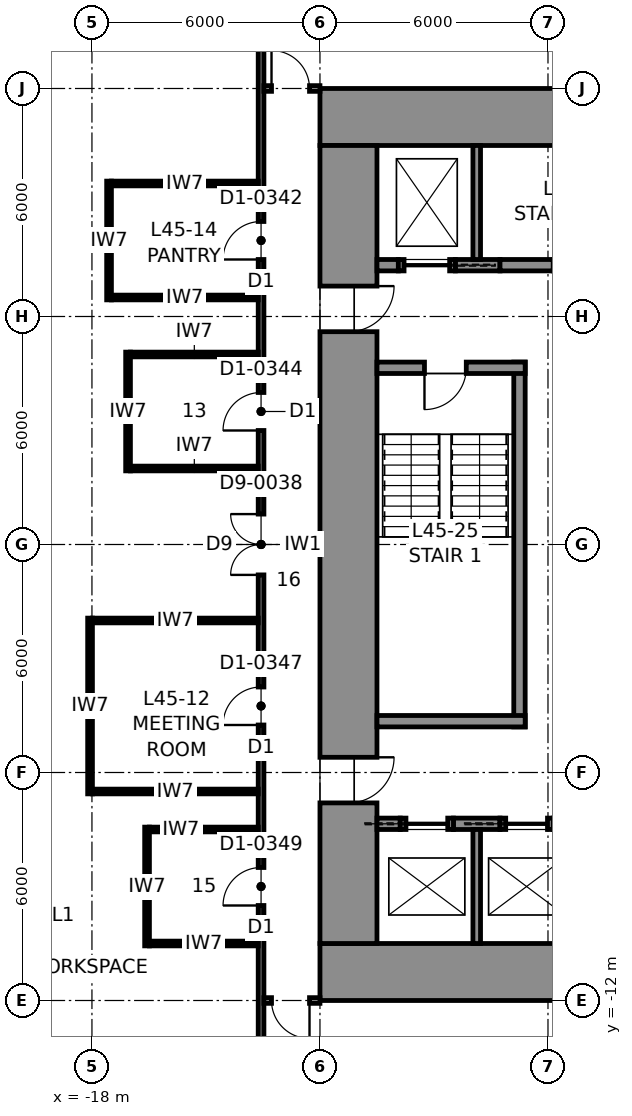
"""IFC4 building model, lengths in metres.
Left out: names, types, materials, properties, quantities, classifications, styles, units other than length and angle.
Written with IfcOpenShell. Run it as: python <this file> out.ifc"""

import sys

from ifc_helpers import new_model, si_unit, direction, frame, frame_2d, origin, place, context, subcontext, project, spatial, rectangle, extrude, element, fill, save


model = new_model("IFC4")
c1 = context("Model", 3, precision=1e-05, world=origin(), true_north=direction((0.0, 1.0)))
c2 = subcontext(c1, "Body", "Model", "MODEL_VIEW")
j1 = project(units=[si_unit("LENGTHUNIT", "METRE"), si_unit("PLANEANGLEUNIT", "RADIAN")], contexts=[c1])
p1 = place(None, origin())
s1 = spatial("IfcSite", under=j1, at=p1, CompositionType="ELEMENT")
p2 = place(p1, origin())
s2 = spatial("IfcBuilding", under=s1, at=p2, CompositionType="ELEMENT")
p3 = place(p2, frame((0.0, 0.0, 209.8)))
s3 = spatial("IfcBuildingStorey", under=s2, at=p3, CompositionType="ELEMENT", Elevation=209.8)
for number, where, z_axis, x_axis in (
    (1, (-12.0, 11.25, 0.0), (0.0, 0.0, 1.0), (1.0, 0.0, 0.0)),
    (2, (12.0, -11.25, 0.0), (0.0, 0.0, 1.0), (-1.0, 0.0, 0.0)),
):
    element("IfcWall", number, at=place(p3, frame(where, z_axis=z_axis, x_axis=x_axis)), inside=s3, PredefinedType="SHEAR", context=c2, shape_type="SweptSolid", body=[
        extrude(rectangle(XDim=24.0, YDim=1.5, at=frame_2d((12.0, 0.0))), origin(), (0.0, 0.0, 1.0), 4.0),
    ])
p4 = place(p3, frame((-11.25, -10.5, 0.0), z_axis=(0.0, 0.0, 1.0), x_axis=(0.0, 1.0, 0.0)))
e3 = element("IfcWall", 3, at=p4, inside=s3, PredefinedType="SHEAR", context=c2, shape_type="SweptSolid", body=[
    extrude(rectangle(XDim=21.0, YDim=1.5, at=frame_2d((10.5, 0.0))), origin(), (0.0, 0.0, 1.0), 4.0),
])
p5 = place(p4, frame((16.1, 0.0, 0.0)))
e4 = element("IfcOpeningElement", 4, at=p5, cuts=e3, PredefinedType="OPENING", context=c2, shape_type="SweptSolid", body=[
    extrude(rectangle(XDim=1.2, YDim=2.3, at=frame_2d((0.6, 1.15))), frame((0.0, 0.76, 0.0), z_axis=(0.0, -1.0, 0.0), x_axis=(1.0, 0.0, 0.0)), (0.0, 0.0, 1.0), 1.52),
])
p6 = place(p4, frame((3.7, 0.0, 0.0)))
e5 = element("IfcOpeningElement", 5, at=p6, cuts=e3, PredefinedType="OPENING", context=c2, shape_type="SweptSolid", body=[
    extrude(rectangle(XDim=1.2, YDim=2.3, at=frame_2d((0.6, 1.15))), frame((0.0, 0.76, 0.0), z_axis=(0.0, -1.0, 0.0), x_axis=(1.0, 0.0, 0.0)), (0.0, 0.0, 1.0), 1.52),
])
p7 = place(p3, frame((-10.5, 7.35, 0.0), z_axis=(0.0, 0.0, 1.0), x_axis=(1.0, 0.0, 0.0)))
e6 = element("IfcWall", 6, at=p7, inside=s3, PredefinedType="SHEAR", context=c2, shape_type="SweptSolid", body=[
    extrude(rectangle(XDim=0.562, YDim=0.3, at=frame_2d((0.281, 0.0))), origin(), (0.0, 0.0, 1.0), 4.0),
])
p8 = place(p3, frame((-8.438, 7.35, 0.0), z_axis=(0.0, 0.0, 1.0), x_axis=(1.0, 0.0, 0.0)))
e7 = element("IfcWall", 7, at=p8, inside=s3, PredefinedType="SHEAR", context=c2, shape_type="SweptSolid", body=[
    extrude(rectangle(XDim=1.175, YDim=0.3, at=frame_2d((0.587, 0.0))), origin(), (0.0, 0.0, 1.0), 4.0),
])
p9 = place(p3, frame((-9.938, 7.35, 0.0), z_axis=(0.0, 0.0, 1.0), x_axis=(1.0, 0.0, 0.0)))
e8 = element("IfcWall", 8, at=p9, inside=s3, PredefinedType="PARTITIONING", context=c2, shape_type="SweptSolid", body=[
    extrude(rectangle(XDim=1.5, YDim=0.3, at=frame_2d((0.75, 0.0))), origin(), (0.0, 0.0, 1.0), 4.0),
])
p10 = place(p9, frame((0.15, 0.0, 0.0)))
e9 = element("IfcOpeningElement", 9, at=p10, cuts=e8, PredefinedType="OPENING", context=c2, shape_type="SweptSolid", body=[
    extrude(rectangle(XDim=1.2, YDim=2.3, at=frame_2d((0.6, 1.15))), frame((0.0, 0.16, 0.0), z_axis=(0.0, -1.0, 0.0), x_axis=(1.0, 0.0, 0.0)), (0.0, 0.0, 1.0), 0.32),
])
p11 = place(p3, frame((-7.262, 7.35, 0.0), z_axis=(0.0, 0.0, 1.0), x_axis=(1.0, 0.0, 0.0)))
e10 = element("IfcWall", 10, at=p11, inside=s3, PredefinedType="PARTITIONING", context=c2, shape_type="SweptSolid", body=[
    extrude(rectangle(XDim=1.4, YDim=0.3, at=frame_2d((0.7, 0.0))), origin(), (0.0, 0.0, 1.0), 4.0),
])
p12 = place(p3, frame((-7.875, 7.5, 0.0), z_axis=(0.0, 0.0, 1.0), x_axis=(0.0, 1.0, 0.0)))
e11 = element("IfcWall", 11, at=p12, inside=s3, PredefinedType="PARTITIONING", context=c2, shape_type="SweptSolid", body=[
    extrude(rectangle(XDim=3.0, YDim=0.2, at=frame_2d((1.5, 0.0))), origin(), (0.0, 0.0, 1.0), 4.0),
])
p13 = place(p3, frame((-10.5, -7.35, 0.0), z_axis=(0.0, 0.0, 1.0), x_axis=(1.0, 0.0, 0.0)))
e12 = element("IfcWall", 12, at=p13, inside=s3, PredefinedType="SHEAR", context=c2, shape_type="SweptSolid", body=[
    extrude(rectangle(XDim=0.613, YDim=0.3, at=frame_2d((0.306, 0.0))), origin(), (0.0, 0.0, 1.0), 4.0),
])
p14 = place(p3, frame((-8.488, -7.35, 0.0), z_axis=(0.0, 0.0, 1.0), x_axis=(1.0, 0.0, 0.0)))
e13 = element("IfcWall", 13, at=p14, inside=s3, PredefinedType="SHEAR", context=c2, shape_type="SweptSolid", body=[
    extrude(rectangle(XDim=1.225, YDim=0.3, at=frame_2d((0.613, 0.0))), origin(), (0.0, 0.0, 1.0), 4.0),
])
p15 = place(p3, frame((-9.887, -7.35, 0.0), z_axis=(0.0, 0.0, 1.0), x_axis=(1.0, 0.0, 0.0)))
e14 = element("IfcWall", 14, at=p15, inside=s3, PredefinedType="PARTITIONING", context=c2, shape_type="SweptSolid", body=[
    extrude(rectangle(XDim=1.4, YDim=0.3, at=frame_2d((0.7, 0.0))), origin(), (0.0, 0.0, 1.0), 4.0),
])
p16 = place(p15, frame((0.15, 0.0, 0.0)))
e15 = element("IfcOpeningElement", 15, at=p16, cuts=e14, PredefinedType="OPENING", context=c2, shape_type="SweptSolid", body=[
    extrude(rectangle(XDim=1.1, YDim=2.3, at=frame_2d((0.55, 1.15))), frame((0.0, 0.16, 0.0), z_axis=(0.0, -1.0, 0.0), x_axis=(1.0, 0.0, 0.0)), (0.0, 0.0, 1.0), 0.32),
])
p17 = place(p3, frame((-7.262, -7.35, 0.0), z_axis=(0.0, 0.0, 1.0), x_axis=(1.0, 0.0, 0.0)))
e16 = element("IfcWall", 16, at=p17, inside=s3, PredefinedType="PARTITIONING", context=c2, shape_type="SweptSolid", body=[
    extrude(rectangle(XDim=1.4, YDim=0.3, at=frame_2d((0.7, 0.0))), origin(), (0.0, 0.0, 1.0), 4.0),
])
p18 = place(p17, frame((0.15, 0.0, 0.0)))
e17 = element("IfcOpeningElement", 17, at=p18, cuts=e16, PredefinedType="OPENING", context=c2, shape_type="SweptSolid", body=[
    extrude(rectangle(XDim=1.1, YDim=2.3, at=frame_2d((0.55, 1.15))), frame((0.0, 0.16, 0.0), z_axis=(0.0, -1.0, 0.0), x_axis=(1.0, 0.0, 0.0)), (0.0, 0.0, 1.0), 0.32),
])
p19 = place(p3, frame((-7.875, -10.5, 0.0), z_axis=(0.0, 0.0, 1.0), x_axis=(0.0, 1.0, 0.0)))
e18 = element("IfcWall", 18, at=p19, inside=s3, PredefinedType="PARTITIONING", context=c2, shape_type="SweptSolid", body=[
    extrude(rectangle(XDim=3.0, YDim=0.2, at=frame_2d((1.5, 0.0))), origin(), (0.0, 0.0, 1.0), 4.0),
])
p20 = place(p3, frame((-13.55, 13.575, 0.0), z_axis=(0.0, 0.0, 1.0), x_axis=(0.0, -1.0, 0.0)))
e19 = element("IfcWall", 19, at=p20, inside=s3, PredefinedType="PARTITIONING", context=c2, shape_type="SweptSolid", body=[
    extrude(rectangle(XDim=27.15, YDim=0.15, at=frame_2d((13.575, 0.0))), origin(), (0.0, 0.0, 1.0), 3.83),
])
p21 = place(p20, frame((12.775, 0.0, 0.0)))
e20 = element("IfcOpeningElement", 20, at=p21, cuts=e19, PredefinedType="OPENING", context=c2, shape_type="SweptSolid", body=[
    extrude(rectangle(XDim=1.6, YDim=2.3, at=frame_2d((0.8, 1.15))), frame((0.0, 0.085, 0.0), z_axis=(0.0, -1.0, 0.0), x_axis=(1.0, 0.0, 0.0)), (0.0, 0.0, 1.0), 0.17),
])
p22 = place(p20, frame((17.325, 0.0, 0.0)))
e21 = element("IfcOpeningElement", 21, at=p22, cuts=e19, PredefinedType="OPENING", context=c2, shape_type="SweptSolid", body=[
    extrude(rectangle(XDim=1.0, YDim=2.3, at=frame_2d((0.5, 1.15))), frame((0.0, 0.085, 0.0), z_axis=(0.0, -1.0, 0.0), x_axis=(1.0, 0.0, 0.0)), (0.0, 0.0, 1.0), 0.17),
])
p23 = place(p20, frame((9.575, 0.0, 0.0)))
e22 = element("IfcOpeningElement", 22, at=p23, cuts=e19, PredefinedType="OPENING", context=c2, shape_type="SweptSolid", body=[
    extrude(rectangle(XDim=1.0, YDim=2.3, at=frame_2d((0.5, 1.15))), frame((0.0, 0.085, 0.0), z_axis=(0.0, -1.0, 0.0), x_axis=(1.0, 0.0, 0.0)), (0.0, 0.0, 1.0), 0.17),
])
p24 = place(p20, frame((5.075, 0.0, 0.0)))
e23 = element("IfcOpeningElement", 23, at=p24, cuts=e19, PredefinedType="OPENING", context=c2, shape_type="SweptSolid", body=[
    extrude(rectangle(XDim=1.0, YDim=2.3, at=frame_2d((0.5, 1.15))), frame((0.0, 0.085, 0.0), z_axis=(0.0, -1.0, 0.0), x_axis=(1.0, 0.0, 0.0)), (0.0, 0.0, 1.0), 0.17),
])
p25 = place(p20, frame((22.075, 0.0, 0.0)))
e24 = element("IfcOpeningElement", 24, at=p25, cuts=e19, PredefinedType="OPENING", context=c2, shape_type="SweptSolid", body=[
    extrude(rectangle(XDim=1.0, YDim=2.3, at=frame_2d((0.5, 1.15))), frame((0.0, 0.085, 0.0), z_axis=(0.0, -1.0, 0.0), x_axis=(1.0, 0.0, 0.0)), (0.0, 0.0, 1.0), 0.17),
])
p26 = place(p3, frame((-13.475, 12.0, 0.0), z_axis=(0.0, 0.0, 1.0), x_axis=(1.0, 0.0, 0.0)))
e25 = element("IfcWall", 25, at=p26, inside=s3, PredefinedType="PARTITIONING", context=c2, shape_type="SweptSolid", body=[
    extrude(rectangle(XDim=1.475, YDim=0.15, at=frame_2d((0.738, 0.0))), origin(), (0.0, 0.0, 1.0), 3.83),
])
p27 = place(p26, frame((0.2, 0.0, 0.0)))
e26 = element("IfcOpeningElement", 26, at=p27, cuts=e25, PredefinedType="OPENING", context=c2, shape_type="SweptSolid", body=[
    extrude(rectangle(XDim=1.0, YDim=2.3, at=frame_2d((0.5, 1.15))), frame((0.0, 0.085, 0.0), z_axis=(0.0, -1.0, 0.0), x_axis=(1.0, 0.0, 0.0)), (0.0, 0.0, 1.0), 0.17),
])
p28 = place(p3, frame((-12.0, -12.0, 0.0), z_axis=(0.0, 0.0, 1.0), x_axis=(-1.0, 0.0, 0.0)))
e27 = element("IfcWall", 27, at=p28, inside=s3, PredefinedType="PARTITIONING", context=c2, shape_type="SweptSolid", body=[
    extrude(rectangle(XDim=1.475, YDim=0.15, at=frame_2d((0.738, 0.0))), origin(), (0.0, 0.0, 1.0), 3.83),
])
p29 = place(p28, frame((0.275, 0.0, 0.0)))
e28 = element("IfcOpeningElement", 28, at=p29, cuts=e27, PredefinedType="OPENING", context=c2, shape_type="SweptSolid", body=[
    extrude(rectangle(XDim=1.0, YDim=2.3, at=frame_2d((0.5, 1.15))), frame((0.0, 0.085, 0.0), z_axis=(0.0, -1.0, 0.0), x_axis=(1.0, 0.0, 0.0)), (0.0, 0.0, 1.0), 0.17),
])
p30 = place(p3, frame((-18.05, -6.562, 0.0), z_axis=(0.0, 0.0, 1.0), x_axis=(0.0, 1.0, 0.0)))
e29 = element("IfcWall", 29, at=p30, inside=s3, PredefinedType="PARTITIONING", context=c2, shape_type="SweptSolid", body=[
    extrude(rectangle(XDim=4.625, YDim=0.125, at=frame_2d((2.312, 0.0))), origin(), (0.0, 0.0, 1.0), 3.83),
])
for number, where, z_axis, x_axis in (
    (30, (-13.625, -6.5, 0.0), (0.0, 0.0, 1.0), (-1.0, 0.0, 0.0)),
    (31, (-13.625, -2.0, 0.0), (0.0, 0.0, 1.0), (-1.0, 0.0, 0.0)),
):
    element("IfcWall", number, at=place(p3, frame(where, z_axis=z_axis, x_axis=x_axis)), inside=s3, PredefinedType="PARTITIONING", context=c2, shape_type="SweptSolid", body=[
        extrude(rectangle(XDim=4.363, YDim=0.125, at=frame_2d((2.181, 0.0))), origin(), (0.0, 0.0, 1.0), 3.83),
    ])
p31 = place(p3, frame((-17.05, 1.938, 0.0), z_axis=(0.0, 0.0, 1.0), x_axis=(0.0, 1.0, 0.0)))
e32 = element("IfcWall", 32, at=p31, inside=s3, PredefinedType="PARTITIONING", context=c2, shape_type="SweptSolid", body=[
    extrude(rectangle(XDim=3.125, YDim=0.125, at=frame_2d((1.562, 0.0))), origin(), (0.0, 0.0, 1.0), 3.83),
])
for number, where, z_axis, x_axis in (
    (33, (-13.625, 2.0, 0.0), (0.0, 0.0, 1.0), (-1.0, 0.0, 0.0)),
    (34, (-13.625, 5.0, 0.0), (0.0, 0.0, 1.0), (-1.0, 0.0, 0.0)),
):
    element("IfcWall", number, at=place(p3, frame(where, z_axis=z_axis, x_axis=x_axis)), inside=s3, PredefinedType="PARTITIONING", context=c2, shape_type="SweptSolid", body=[
        extrude(rectangle(XDim=3.363, YDim=0.125, at=frame_2d((1.681, 0.0))), origin(), (0.0, 0.0, 1.0), 3.83),
    ])
p32 = place(p3, frame((-17.55, 6.438, 0.0), z_axis=(0.0, 0.0, 1.0), x_axis=(0.0, 1.0, 0.0)))
e35 = element("IfcWall", 35, at=p32, inside=s3, PredefinedType="PARTITIONING", context=c2, shape_type="SweptSolid", body=[
    extrude(rectangle(XDim=3.125, YDim=0.125, at=frame_2d((1.562, 0.0))), origin(), (0.0, 0.0, 1.0), 3.83),
])
for number, where, z_axis, x_axis in (
    (36, (-13.625, 6.5, 0.0), (0.0, 0.0, 1.0), (-1.0, 0.0, 0.0)),
    (37, (-13.625, 9.5, 0.0), (0.0, 0.0, 1.0), (-1.0, 0.0, 0.0)),
):
    element("IfcWall", number, at=place(p3, frame(where, z_axis=z_axis, x_axis=x_axis)), inside=s3, PredefinedType="PARTITIONING", context=c2, shape_type="SweptSolid", body=[
        extrude(rectangle(XDim=3.863, YDim=0.125, at=frame_2d((1.931, 0.0))), origin(), (0.0, 0.0, 1.0), 3.83),
    ])
p33 = place(p3, frame((-16.55, -10.562, 0.0), z_axis=(0.0, 0.0, 1.0), x_axis=(0.0, 1.0, 0.0)))
e38 = element("IfcWall", 38, at=p33, inside=s3, PredefinedType="PARTITIONING", context=c2, shape_type="SweptSolid", body=[
    extrude(rectangle(XDim=3.125, YDim=0.125, at=frame_2d((1.562, 0.0))), origin(), (0.0, 0.0, 1.0), 3.83),
])
for number, where, z_axis, x_axis in (
    (39, (-13.625, -10.5, 0.0), (0.0, 0.0, 1.0), (-1.0, 0.0, 0.0)),
    (40, (-13.625, -7.5, 0.0), (0.0, 0.0, 1.0), (-1.0, 0.0, 0.0)),
):
    element("IfcWall", number, at=place(p3, frame(where, z_axis=z_axis, x_axis=x_axis)), inside=s3, PredefinedType="PARTITIONING", context=c2, shape_type="SweptSolid", body=[
        extrude(rectangle(XDim=2.863, YDim=0.125, at=frame_2d((1.431, 0.0))), origin(), (0.0, 0.0, 1.0), 3.83),
    ])
p34 = place(p3, frame((-6.75, -4.8, 0.0), z_axis=(0.0, 0.0, 1.0), x_axis=(0.0, 1.0, 0.0)))
e41 = element("IfcWall", 41, at=p34, inside=s3, PredefinedType="SOLIDWALL", context=c2, shape_type="SweptSolid", body=[
    extrude(rectangle(XDim=9.6, YDim=0.3, at=frame_2d((4.8, 0.0))), origin(), (0.0, 0.0, 1.0), 3.75),
])
p35 = place(p3, frame((-10.5, 4.65, 0.0), z_axis=(0.0, 0.0, 1.0), x_axis=(1.0, 0.0, 0.0)))
e42 = element("IfcWall", 42, at=p35, inside=s3, PredefinedType="SOLIDWALL", context=c2, shape_type="SweptSolid", body=[
    extrude(rectangle(XDim=3.9, YDim=0.3, at=frame_2d((1.95, 0.0))), origin(), (0.0, 0.0, 1.0), 3.75),
])
p36 = place(p35, frame((1.25, 0.0, 0.0)))
e43 = element("IfcOpeningElement", 43, at=p36, cuts=e42, PredefinedType="OPENING", context=c2, shape_type="SweptSolid", body=[
    extrude(rectangle(XDim=1.1, YDim=2.3, at=frame_2d((0.55, 1.15))), frame((0.0, 0.16, 0.0), z_axis=(0.0, -1.0, 0.0), x_axis=(1.0, 0.0, 0.0)), (0.0, 0.0, 1.0), 0.32),
])
p37 = place(p3, frame((-6.6, -4.65, 0.0), z_axis=(0.0, 0.0, 1.0), x_axis=(-1.0, 0.0, 0.0)))
e44 = element("IfcWall", 44, at=p37, inside=s3, PredefinedType="SOLIDWALL", context=c2, shape_type="SweptSolid", body=[
    extrude(rectangle(XDim=3.9, YDim=0.3, at=frame_2d((1.95, 0.0))), origin(), (0.0, 0.0, 1.0), 3.75),
])
p38 = place(p27, origin())
e45 = element("IfcDoor", 45, at=p38, inside=s3, OperationType="SINGLE_SWING_LEFT", PredefinedType="DOOR", context=c2, shape_type="SweptSolid", body=[
    extrude(rectangle(XDim=1.0, YDim=2.3, at=frame_2d((0.5, 1.15))), frame((0.0, 0.025, 0.0), z_axis=(0.0, -1.0, 0.0), x_axis=(1.0, 0.0, 0.0)), (0.0, 0.0, 1.0), 0.05),
])
fill(e26, e45)
p39 = place(p29, origin())
e46 = element("IfcDoor", 46, at=p39, inside=s3, OperationType="SINGLE_SWING_LEFT", PredefinedType="DOOR", context=c2, shape_type="SweptSolid", body=[
    extrude(rectangle(XDim=1.0, YDim=2.3, at=frame_2d((0.5, 1.15))), frame((0.0, 0.025, 0.0), z_axis=(0.0, -1.0, 0.0), x_axis=(1.0, 0.0, 0.0)), (0.0, 0.0, 1.0), 0.05),
])
fill(e28, e46)
p40 = place(p21, frame((1.6, 0.0, 0.0), z_axis=(0.0, 0.0, 1.0), x_axis=(-1.0, 0.0, 0.0)))
e47 = element("IfcDoor", 47, at=p40, inside=s3, OperationType="DOUBLE_DOOR_SINGLE_SWING", PredefinedType="DOOR", context=c2, shape_type="SweptSolid", body=[
    extrude(rectangle(XDim=1.6, YDim=2.3, at=frame_2d((0.8, 1.15))), frame((0.0, 0.025, 0.0), z_axis=(0.0, -1.0, 0.0), x_axis=(1.0, 0.0, 0.0)), (0.0, 0.0, 1.0), 0.05),
])
fill(e20, e47)
p41 = place(p22, frame((1.0, 0.0, 0.0), z_axis=(0.0, 0.0, 1.0), x_axis=(-1.0, 0.0, 0.0)))
e48 = element("IfcDoor", 48, at=p41, inside=s3, OperationType="SINGLE_SWING_LEFT", PredefinedType="DOOR", context=c2, shape_type="SweptSolid", body=[
    extrude(rectangle(XDim=1.0, YDim=2.3, at=frame_2d((0.5, 1.15))), frame((0.0, 0.025, 0.0), z_axis=(0.0, -1.0, 0.0), x_axis=(1.0, 0.0, 0.0)), (0.0, 0.0, 1.0), 0.05),
])
fill(e21, e48)
p42 = place(p23, frame((1.0, 0.0, 0.0), z_axis=(0.0, 0.0, 1.0), x_axis=(-1.0, 0.0, 0.0)))
e49 = element("IfcDoor", 49, at=p42, inside=s3, OperationType="SINGLE_SWING_LEFT", PredefinedType="DOOR", context=c2, shape_type="SweptSolid", body=[
    extrude(rectangle(XDim=1.0, YDim=2.3, at=frame_2d((0.5, 1.15))), frame((0.0, 0.025, 0.0), z_axis=(0.0, -1.0, 0.0), x_axis=(1.0, 0.0, 0.0)), (0.0, 0.0, 1.0), 0.05),
])
fill(e22, e49)
p43 = place(p24, frame((1.0, 0.0, 0.0), z_axis=(0.0, 0.0, 1.0), x_axis=(-1.0, 0.0, 0.0)))
e50 = element("IfcDoor", 50, at=p43, inside=s3, OperationType="SINGLE_SWING_LEFT", PredefinedType="DOOR", context=c2, shape_type="SweptSolid", body=[
    extrude(rectangle(XDim=1.0, YDim=2.3, at=frame_2d((0.5, 1.15))), frame((0.0, 0.025, 0.0), z_axis=(0.0, -1.0, 0.0), x_axis=(1.0, 0.0, 0.0)), (0.0, 0.0, 1.0), 0.05),
])
fill(e23, e50)
p44 = place(p25, frame((1.0, 0.0, 0.0), z_axis=(0.0, 0.0, 1.0), x_axis=(-1.0, 0.0, 0.0)))
e51 = element("IfcDoor", 51, at=p44, inside=s3, OperationType="SINGLE_SWING_LEFT", PredefinedType="DOOR", context=c2, shape_type="SweptSolid", body=[
    extrude(rectangle(XDim=1.0, YDim=2.3, at=frame_2d((0.5, 1.15))), frame((0.0, 0.025, 0.0), z_axis=(0.0, -1.0, 0.0), x_axis=(1.0, 0.0, 0.0)), (0.0, 0.0, 1.0), 0.05),
])
fill(e24, e51)
p45 = place(p36, frame((1.1, 0.0, 0.0), z_axis=(0.0, 0.0, 1.0), x_axis=(-1.0, 0.0, 0.0)))
e52 = element("IfcDoor", 52, at=p45, inside=s3, OperationType="SINGLE_SWING_RIGHT", PredefinedType="DOOR", context=c2, shape_type="SweptSolid", body=[
    extrude(rectangle(XDim=1.1, YDim=2.3, at=frame_2d((0.55, 1.15))), frame((0.0, 0.025, 0.0), z_axis=(0.0, -1.0, 0.0), x_axis=(1.0, 0.0, 0.0)), (0.0, 0.0, 1.0), 0.05),
])
fill(e43, e52)
p46 = place(p5, frame((1.2, 0.0, 0.0), z_axis=(0.0, 0.0, 1.0), x_axis=(-1.0, 0.0, 0.0)))
e53 = element("IfcDoor", 53, at=p46, inside=s3, OperationType="SINGLE_SWING_LEFT", PredefinedType="DOOR", context=c2, shape_type="SweptSolid", body=[
    extrude(rectangle(XDim=1.2, YDim=2.3, at=frame_2d((0.6, 1.15))), frame((0.0, 0.025, 0.0), z_axis=(0.0, -1.0, 0.0), x_axis=(1.0, 0.0, 0.0)), (0.0, 0.0, 1.0), 0.05),
])
fill(e4, e53)
p47 = place(p6, frame((1.2, 0.0, 0.0), z_axis=(0.0, 0.0, 1.0), x_axis=(-1.0, 0.0, 0.0)))
e54 = element("IfcDoor", 54, at=p47, inside=s3, OperationType="SINGLE_SWING_LEFT", PredefinedType="DOOR", context=c2, shape_type="SweptSolid", body=[
    extrude(rectangle(XDim=1.2, YDim=2.3, at=frame_2d((0.6, 1.15))), frame((0.0, 0.025, 0.0), z_axis=(0.0, -1.0, 0.0), x_axis=(1.0, 0.0, 0.0)), (0.0, 0.0, 1.0), 0.05),
])
fill(e5, e54)
p48 = place(p10, frame((1.2, 0.0, 0.0), z_axis=(0.0, 0.0, 1.0), x_axis=(-1.0, 0.0, 0.0)))
e55 = element("IfcDoor", 55, at=p48, inside=s3, OperationType="SLIDING_TO_LEFT", PredefinedType="DOOR", context=c2, shape_type="SweptSolid", body=[
    extrude(rectangle(XDim=1.2, YDim=2.3, at=frame_2d((0.6, 1.15))), frame((0.0, 0.025, 0.0), z_axis=(0.0, -1.0, 0.0), x_axis=(1.0, 0.0, 0.0)), (0.0, 0.0, 1.0), 0.05),
])
fill(e9, e55)
p49 = place(p18, origin())
e56 = element("IfcDoor", 56, at=p49, inside=s3, OperationType="SLIDING_TO_LEFT", PredefinedType="DOOR", context=c2, shape_type="SweptSolid", body=[
    extrude(rectangle(XDim=1.1, YDim=2.3, at=frame_2d((0.55, 1.15))), frame((0.0, 0.025, 0.0), z_axis=(0.0, -1.0, 0.0), x_axis=(1.0, 0.0, 0.0)), (0.0, 0.0, 1.0), 0.05),
])
fill(e17, e56)
p50 = place(p16, origin())
e57 = element("IfcDoor", 57, at=p50, inside=s3, OperationType="SLIDING_TO_LEFT", PredefinedType="DOOR", context=c2, shape_type="SweptSolid", body=[
    extrude(rectangle(XDim=1.1, YDim=2.3, at=frame_2d((0.55, 1.15))), frame((0.0, 0.025, 0.0), z_axis=(0.0, -1.0, 0.0), x_axis=(1.0, 0.0, 0.0)), (0.0, 0.0, 1.0), 0.05),
])
fill(e15, e57)
save(model, sys.argv[1])
